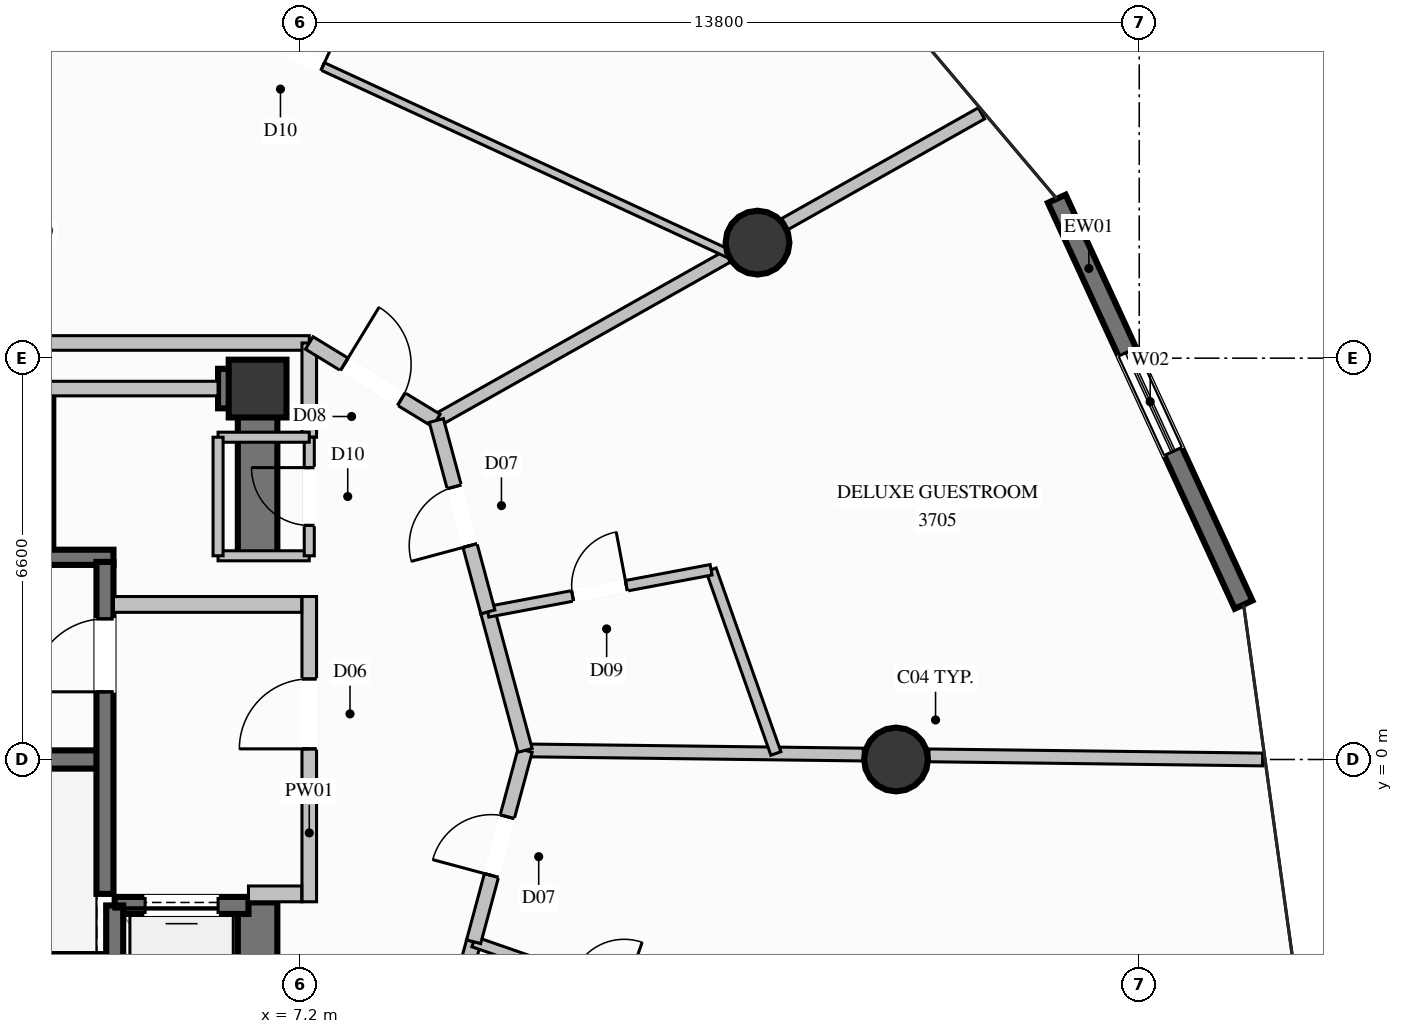
"""IFC4 building model, lengths in metres.
Left out: names, types, materials, properties, quantities, classifications, styles, units other than length and angle.
Written with IfcOpenShell. Run it as: python <this file> out.ifc"""

import sys

from ifc_helpers import new_model, si_unit, direction, frame, frame_2d, origin, origin_2d, place, context, subcontext, project, spatial, rectangle, circle, extrude, element, fill, save


model = new_model("IFC4")
c1 = context("Model", 3, precision=1e-05, world=origin(), true_north=direction((0.0, 1.0)))
c2 = subcontext(c1, "Body", "Model", "MODEL_VIEW")
j1 = project(units=[si_unit("LENGTHUNIT", "METRE"), si_unit("PLANEANGLEUNIT", "RADIAN")], contexts=[c1])
p1 = place(None, origin())
s1 = spatial("IfcSite", under=j1, at=p1, CompositionType="ELEMENT")
p2 = place(p1, origin())
s2 = spatial("IfcBuilding", under=s1, at=p2, CompositionType="ELEMENT")
p3 = place(p2, frame((0.0, 0.0, 138.6)))
s3 = spatial("IfcBuildingStorey", under=s2, at=p3, CompositionType="ELEMENT", Elevation=138.6)
p4 = place(p3, frame((6.5, 6.1, 0.0), z_axis=(0.0, 0.0, 1.0), x_axis=(1.0, 0.0, 0.0)))
e1 = element("IfcColumn", 1, at=p4, inside=s3, PredefinedType="COLUMN", context=c2, shape_type="SweptSolid", body=[
    extrude(rectangle(XDim=0.95, YDim=0.95, at=origin_2d()), origin(), (0.0, 0.0, 1.0), 3.6),
])
p5 = place(p3, frame((-3.99, 0.0, 0.0), z_axis=(0.0, 0.0, 1.0), x_axis=(1.0, 0.0, 0.0)))
e2 = element("IfcWall", 2, at=p5, inside=s3, PredefinedType="SHEAR", context=c2, shape_type="SweptSolid", body=[
    extrude(rectangle(XDim=7.98, YDim=0.3, at=frame_2d((3.99, 0.0))), origin(), (0.0, 0.0, 1.0), 3.6),
])
for number, where, z_axis, x_axis in (
    (3, (-4.13, -3.325, 0.0), (0.0, 0.0, 1.0), (1.0, 0.0, 0.0)),
    (4, (-4.13, 3.325, 0.0), (0.0, 0.0, 1.0), (1.0, 0.0, 0.0)),
):
    element("IfcWall", number, at=place(p3, frame(where, z_axis=z_axis, x_axis=x_axis)), inside=s3, PredefinedType="SOLIDWALL", context=c2, shape_type="SweptSolid", body=[
        extrude(rectangle(XDim=8.26, YDim=0.25, at=frame_2d((4.13, 0.0))), origin(), (0.0, 0.0, 1.0), 3.6),
    ])
p6 = place(p3, frame((5.85, 6.1, 0.0), z_axis=(0.0, 0.0, 1.0), x_axis=(1.0, 0.0, 0.0)))
e5 = element("IfcWall", 5, at=p6, inside=s3, PredefinedType="SHEAR", context=c2, shape_type="SweptSolid", body=[
    extrude(rectangle(XDim=0.325, YDim=0.65, at=frame_2d((0.163, 0.0))), origin(), (0.0, 0.0, 1.0), 3.6),
])
p7 = place(p3, frame((6.5, -6.425, 0.0), z_axis=(0.0, 0.0, 1.0), x_axis=(0.0, 1.0, 0.0)))
e6 = element("IfcWall", 6, at=p7, inside=s3, PredefinedType="SHEAR", context=c2, shape_type="SweptSolid", body=[
    extrude(rectangle(XDim=4.075, YDim=0.65, at=frame_2d((2.038, 0.0))), origin(), (0.0, 0.0, 1.0), 3.6),
])
p8 = place(p3, frame((6.5, 3.35, 0.0), z_axis=(0.0, 0.0, 1.0), x_axis=(0.0, 1.0, 0.0)))
e7 = element("IfcWall", 7, at=p8, inside=s3, PredefinedType="SHEAR", context=c2, shape_type="SweptSolid", body=[
    extrude(rectangle(XDim=3.075, YDim=0.65, at=frame_2d((1.538, 0.0))), origin(), (0.0, 0.0, 1.0), 3.6),
])
for number, where, z_axis, x_axis in (
    (8, (17.0, 0.0, 0.0), (0.0, 0.0, 1.0), (1.0, 0.0, 0.0)),
    (9, (14.722, 8.5, 0.0), (0.0, 0.0, 1.0), (1.0, 0.0, 0.0)),
):
    element("IfcColumn", number, at=place(p3, frame(where, z_axis=z_axis, x_axis=x_axis)), inside=s3, PredefinedType="COLUMN", context=c2, shape_type="SweptSolid", body=[
        extrude(circle(Radius=0.525, at=origin_2d()), origin(), (0.0, 0.0, 1.0), 3.6),
    ])
p9 = place(p3, frame((19.644, 9.221, 0.0), z_axis=(0.0, 0.0, 1.0), x_axis=(0.4181370769, -0.90838394136, 0.0)))
e10 = element("IfcWall", 10, at=p9, inside=s3, PredefinedType="SOLIDWALL", context=c2, shape_type="SweptSolid", body=[
    extrude(rectangle(XDim=7.347, YDim=0.32, at=frame_2d((3.673, 0.0))), origin(), (0.0, 0.0, 1.0), 3.35),
])
p10 = place(p9, frame((2.774, 0.0, 0.35)))
e11 = element("IfcOpeningElement", 11, at=p10, cuts=e10, PredefinedType="OPENING", context=c2, shape_type="SweptSolid", body=[
    extrude(rectangle(XDim=1.8, YDim=2.6, at=frame_2d((0.9, 1.3))), frame((0.0, 0.17, 0.0), z_axis=(0.0, -1.0, 0.0), x_axis=(1.0, 0.0, 0.0)), (0.0, 0.0, 1.0), 0.34),
])
p11 = place(p3, frame((3.0, 3.5, 0.0), z_axis=(0.0, 0.0, 1.0), x_axis=(0.0, 1.0, 0.0)))
e12 = element("IfcWall", 12, at=p11, inside=s3, PredefinedType="SOLIDWALL", context=c2, shape_type="SweptSolid", body=[
    extrude(rectangle(XDim=2.5, YDim=0.28, at=frame_2d((1.25, 0.0))), origin(), (0.0, 0.0, 1.0), 3.35),
])
p12 = place(p3, frame((6.35, -2.4, 0.0), z_axis=(0.0, 0.0, 1.0), x_axis=(-1.0, 0.0, 0.0)))
e13 = element("IfcWall", 13, at=p12, inside=s3, PredefinedType="SOLIDWALL", context=c2, shape_type="SweptSolid", body=[
    extrude(rectangle(XDim=2.2, YDim=0.28, at=frame_2d((1.1, 0.0))), origin(), (0.0, 0.0, 1.0), 3.35),
])
p13 = place(p12, frame((0.5, 0.0, 0.0)))
e14 = element("IfcOpeningElement", 14, at=p13, cuts=e13, PredefinedType="OPENING", context=c2, shape_type="SweptSolid", body=[
    extrude(rectangle(XDim=1.2, YDim=2.2, at=frame_2d((0.6, 1.1))), frame((0.0, 0.15, 0.0), z_axis=(0.0, -1.0, 0.0), x_axis=(1.0, 0.0, 0.0)), (0.0, 0.0, 1.0), 0.3),
])
p14 = place(p3, frame((4.15, -2.4, 0.0), z_axis=(0.0, 0.0, 1.0), x_axis=(0.0, -1.0, 0.0)))
e15 = element("IfcWall", 15, at=p14, inside=s3, PredefinedType="SOLIDWALL", context=c2, shape_type="SweptSolid", body=[
    extrude(rectangle(XDim=2.7, YDim=0.28, at=frame_2d((1.35, 0.0))), origin(), (0.0, 0.0, 1.0), 3.35),
])
p15 = place(p3, frame((3.99, -2.21, 0.0), z_axis=(0.0, 0.0, 1.0), x_axis=(0.0, 1.0, 0.0)))
e16 = element("IfcWall", 16, at=p15, inside=s3, PredefinedType="SOLIDWALL", context=c2, shape_type="SweptSolid", body=[
    extrude(rectangle(XDim=5.46, YDim=0.28, at=frame_2d((2.73, 0.0))), origin(), (0.0, 0.0, 1.0), 3.35),
])
p16 = place(p15, frame((3.323, 0.0, 0.0)))
e17 = element("IfcOpeningElement", 17, at=p16, cuts=e16, PredefinedType="OPENING", context=c2, shape_type="SweptSolid", body=[
    extrude(rectangle(XDim=1.2, YDim=2.2, at=frame_2d((0.6, 1.1))), frame((0.0, 0.15, 0.0), z_axis=(0.0, -1.0, 0.0), x_axis=(1.0, 0.0, 0.0)), (0.0, 0.0, 1.0), 0.3),
])
p17 = place(p3, frame((7.35, -2.34, 0.0), z_axis=(0.0, 0.0, 1.0), x_axis=(0.0, 1.0, 0.0)))
e18 = element("IfcWall", 18, at=p17, inside=s3, PredefinedType="PARTITIONING", context=c2, shape_type="SweptSolid", body=[
    extrude(rectangle(XDim=5.02, YDim=0.24, at=frame_2d((2.51, 0.0))), origin(), (0.0, 0.0, 1.0), 2.435),
])
p18 = place(p17, frame((2.515, 0.0, 0.0)))
e19 = element("IfcOpeningElement", 19, at=p18, cuts=e18, PredefinedType="OPENING", context=c2, shape_type="SweptSolid", body=[
    extrude(rectangle(XDim=1.15, YDim=2.2, at=frame_2d((0.575, 1.1))), frame((0.0, 0.13, 0.0), z_axis=(0.0, -1.0, 0.0), x_axis=(1.0, 0.0, 0.0)), (0.0, 0.0, 1.0), 0.26),
])
p19 = place(p3, frame((6.35, -2.21, 0.0), z_axis=(0.0, 0.0, 1.0), x_axis=(1.0, 0.0, 0.0)))
e20 = element("IfcWall", 20, at=p19, inside=s3, PredefinedType="PARTITIONING", context=c2, shape_type="SweptSolid", body=[
    extrude(rectangle(XDim=0.875, YDim=0.26, at=frame_2d((0.438, 0.0))), origin(), (0.0, 0.0, 1.0), 3.35),
])
p20 = place(p3, frame((4.13, 2.55, 0.0), z_axis=(0.0, 0.0, 1.0), x_axis=(1.0, 0.0, 0.0)))
e21 = element("IfcWall", 21, at=p20, inside=s3, PredefinedType="PARTITIONING", context=c2, shape_type="SweptSolid", body=[
    extrude(rectangle(XDim=3.095, YDim=0.26, at=frame_2d((1.548, 0.0))), origin(), (0.0, 0.0, 1.0), 3.35),
])
p21 = place(p3, frame((-7.35, 6.85, 0.0), z_axis=(0.0, 0.0, 1.0), x_axis=(1.0, 0.0, 0.0)))
e22 = element("IfcWall", 22, at=p21, inside=s3, PredefinedType="PARTITIONING", context=c2, shape_type="SweptSolid", body=[
    extrude(rectangle(XDim=14.7, YDim=0.24, at=frame_2d((7.35, 0.0))), origin(), (0.0, 0.0, 1.0), 2.435),
])
p22 = place(p3, frame((7.35, 5.3, 0.0), z_axis=(0.0, 0.0, 1.0), x_axis=(0.0, 1.0, 0.0)))
e23 = element("IfcWall", 23, at=p22, inside=s3, PredefinedType="PARTITIONING", context=c2, shape_type="SweptSolid", body=[
    extrude(rectangle(XDim=1.55, YDim=0.24, at=frame_2d((0.775, 0.0))), origin(), (0.0, 0.0, 1.0), 2.435),
])
p23 = place(p3, frame((3.0, 6.1, 0.0), z_axis=(0.0, 0.0, 1.0), x_axis=(1.0, 0.0, 0.0)))
e24 = element("IfcWall", 24, at=p23, inside=s3, PredefinedType="PARTITIONING", context=c2, shape_type="SweptSolid", body=[
    extrude(rectangle(XDim=2.85, YDim=0.24, at=frame_2d((1.425, 0.0))), origin(), (0.0, 0.0, 1.0), 2.435),
])
p24 = place(p3, frame((5.85, 3.35, 0.0), z_axis=(0.0, 0.0, 1.0), x_axis=(1.0, 0.0, 0.0)))
e25 = element("IfcWall", 25, at=p24, inside=s3, PredefinedType="PARTITIONING", context=c2, shape_type="SweptSolid", body=[
    extrude(rectangle(XDim=1.5, YDim=0.165, at=frame_2d((0.75, 0.0))), origin(), (0.0, 0.0, 1.0), 3.35),
])
p25 = place(p3, frame((7.35, 3.35, 0.0), z_axis=(0.0, 0.0, 1.0), x_axis=(0.0, 1.0, 0.0)))
e26 = element("IfcWall", 26, at=p25, inside=s3, PredefinedType="PARTITIONING", context=c2, shape_type="SweptSolid", body=[
    extrude(rectangle(XDim=1.95, YDim=0.165, at=frame_2d((0.975, 0.0))), origin(), (0.0, 0.0, 1.0), 3.35),
])
p26 = place(p25, frame((0.5, 0.0, 0.0)))
e27 = element("IfcOpeningElement", 27, at=p26, cuts=e26, PredefinedType="OPENING", context=c2, shape_type="SweptSolid", body=[
    extrude(rectangle(XDim=0.95, YDim=2.1, at=frame_2d((0.475, 1.05))), frame((0.0, 0.093, 0.0), z_axis=(0.0, -1.0, 0.0), x_axis=(1.0, 0.0, 0.0)), (0.0, 0.0, 1.0), 0.185),
])
p27 = place(p3, frame((7.35, 5.3, 0.0), z_axis=(0.0, 0.0, 1.0), x_axis=(-1.0, 0.0, 0.0)))
e28 = element("IfcWall", 28, at=p27, inside=s3, PredefinedType="PARTITIONING", context=c2, shape_type="SweptSolid", body=[
    extrude(rectangle(XDim=1.5, YDim=0.165, at=frame_2d((0.75, 0.0))), origin(), (0.0, 0.0, 1.0), 2.435),
])
p28 = place(p3, frame((5.85, 5.3, 0.0), z_axis=(0.0, 0.0, 1.0), x_axis=(0.0, -1.0, 0.0)))
e29 = element("IfcWall", 29, at=p28, inside=s3, PredefinedType="PARTITIONING", context=c2, shape_type="SweptSolid", body=[
    extrude(rectangle(XDim=1.95, YDim=0.165, at=frame_2d((0.975, 0.0))), origin(), (0.0, 0.0, 1.0), 2.435),
])
p29 = place(p3, frame((10.9, 0.15, 0.0), z_axis=(0.0, 0.0, 1.0), x_axis=(0.999923372065, -0.012379418339, 0.0)))
e30 = element("IfcWall", 30, at=p29, inside=s3, PredefinedType="PARTITIONING", context=c2, shape_type="SweptSolid", body=[
    extrude(rectangle(XDim=5.562, YDim=0.21, at=frame_2d((2.781, 0.0))), origin(), (0.0, 0.0, 1.0), 3.35),
])
p30 = place(p3, frame((17.541, 0.068, 0.0), z_axis=(0.0, 0.0, 1.0), x_axis=(0.999922985187, -0.012410628269, 0.0)))
e31 = element("IfcWall", 31, at=p30, inside=s3, PredefinedType="PARTITIONING", context=c2, shape_type="SweptSolid", body=[
    extrude(rectangle(XDim=5.489, YDim=0.21, at=frame_2d((2.744, 0.0))), origin(), (0.0, 0.0, 1.0), 3.35),
])
p31 = place(p3, frame((9.44, 5.575, 0.0), z_axis=(0.0, 0.0, 1.0), x_axis=(0.871243078021, 0.490851809613, 0.0)))
e32 = element("IfcWall", 32, at=p31, inside=s3, PredefinedType="PARTITIONING", context=c2, shape_type="SweptSolid", body=[
    extrude(rectangle(XDim=5.495, YDim=0.21, at=frame_2d((2.747, 0.0))), origin(), (0.0, 0.0, 1.0), 2.791),
])
p32 = place(p3, frame((15.173, 8.806, 0.0), z_axis=(0.0, 0.0, 1.0), x_axis=(0.871269436628, 0.490805021162, 0.0)))
e33 = element("IfcWall", 33, at=p32, inside=s3, PredefinedType="PARTITIONING", context=c2, shape_type="SweptSolid", body=[
    extrude(rectangle(XDim=3.708, YDim=0.21, at=frame_2d((1.854, 0.0))), origin(), (0.0, 0.0, 1.0), 3.35),
])
p33 = place(p3, frame((7.35, 6.85, 0.0), z_axis=(0.0, 0.0, 1.0), x_axis=(0.853641534933, -0.520860950579, 0.0)))
e34 = element("IfcWall", 34, at=p33, inside=s3, PredefinedType="PARTITIONING", context=c2, shape_type="SweptSolid", body=[
    extrude(rectangle(XDim=2.448, YDim=0.24, at=frame_2d((1.224, 0.0))), origin(), (0.0, 0.0, 1.0), 3.35),
])
p34 = place(p33, frame((0.674, 0.0, 0.0)))
e35 = element("IfcOpeningElement", 35, at=p34, cuts=e34, PredefinedType="OPENING", context=c2, shape_type="SweptSolid", body=[
    extrude(rectangle(XDim=1.1, YDim=2.3, at=frame_2d((0.55, 1.15))), frame((0.0, 0.13, 0.0), z_axis=(0.0, -1.0, 0.0), x_axis=(1.0, 0.0, 0.0)), (0.0, 0.0, 1.0), 0.26),
])
p35 = place(p3, frame((0.0, 14.89, 0.0), z_axis=(0.0, 0.0, 1.0), x_axis=(0.908063857852, -0.418831744335, 0.0)))
e36 = element("IfcWall", 36, at=p35, inside=s3, PredefinedType="PARTITIONING", context=c2, shape_type="SweptSolid", body=[
    extrude(rectangle(XDim=15.727, YDim=0.135, at=frame_2d((7.863, 0.0))), origin(), (0.0, 0.0, 1.0), 2.878),
])
p36 = place(p35, frame((7.388, 0.0, 0.0)))
e37 = element("IfcOpeningElement", 37, at=p36, cuts=e36, PredefinedType="OPENING", context=c2, shape_type="SweptSolid", body=[
    extrude(rectangle(XDim=0.95, YDim=2.1, at=frame_2d((0.475, 1.05))), frame((0.0, 0.078, 0.0), z_axis=(0.0, -1.0, 0.0), x_axis=(1.0, 0.0, 0.0)), (0.0, 0.0, 1.0), 0.155),
])
p37 = place(p3, frame((9.44, -5.275, 0.0), z_axis=(0.0, 0.0, 1.0), x_axis=(0.25988439237, 0.965639737481, 0.0)))
e38 = element("IfcWall", 38, at=p37, inside=s3, PredefinedType="PARTITIONING", context=c2, shape_type="SweptSolid", body=[
    extrude(rectangle(XDim=2.359, YDim=0.24, at=frame_2d((1.179, 0.0))), origin(), (0.0, 0.0, 1.0), 3.35),
])
p38 = place(p3, frame((10.053, -2.997, 0.0), z_axis=(0.0, 0.0, 1.0), x_axis=(0.944684797039, -0.327979624737, 0.0)))
e39 = element("IfcWall", 39, at=p38, inside=s3, PredefinedType="PLUMBINGWALL", context=c2, shape_type="SweptSolid", body=[
    extrude(rectangle(XDim=4.341, YDim=0.175, at=frame_2d((2.171, 0.0))), origin(), (0.0, 0.0, 1.0), 3.35),
])
p39 = place(p38, frame((1.721, 0.0, 0.0)))
e40 = element("IfcOpeningElement", 40, at=p39, cuts=e39, PredefinedType="OPENING", context=c2, shape_type="SweptSolid", body=[
    extrude(rectangle(XDim=0.9, YDim=2.1, at=frame_2d((0.45, 1.05))), frame((0.0, 0.098, 0.0), z_axis=(0.0, -1.0, 0.0), x_axis=(1.0, 0.0, 0.0)), (0.0, 0.0, 1.0), 0.195),
])
p40 = place(p3, frame((10.053, -2.997, 0.0), z_axis=(0.0, 0.0, 1.0), x_axis=(0.259876755553, 0.965641792759, 0.0)))
e41 = element("IfcWall", 41, at=p40, inside=s3, PredefinedType="PARTITIONING", context=c2, shape_type="SweptSolid", body=[
    extrude(rectangle(XDim=3.259, YDim=0.24, at=frame_2d((1.629, 0.0))), origin(), (0.0, 0.0, 1.0), 2.985),
])
p41 = place(p40, frame((1.129, 0.0, 0.0)))
e42 = element("IfcOpeningElement", 42, at=p41, cuts=e41, PredefinedType="OPENING", context=c2, shape_type="SweptSolid", body=[
    extrude(rectangle(XDim=1.0, YDim=2.2, at=frame_2d((0.5, 1.1))), frame((0.0, 0.13, 0.0), z_axis=(0.0, -1.0, 0.0), x_axis=(1.0, 0.0, 0.0)), (0.0, 0.0, 1.0), 0.26),
])
p42 = place(p3, frame((10.9, 0.15, 0.0), z_axis=(0.0, 0.0, 1.0), x_axis=(-0.259761917731, 0.965672690976, 0.0)))
e43 = element("IfcWall", 43, at=p42, inside=s3, PredefinedType="PARTITIONING", context=c2, shape_type="SweptSolid", body=[
    extrude(rectangle(XDim=2.359, YDim=0.24, at=frame_2d((1.18, 0.0))), origin(), (0.0, 0.0, 1.0), 2.985),
])
p43 = place(p3, frame((15.024, 0.099, 0.0), z_axis=(0.0, 0.0, 1.0), x_axis=(-0.332461284511, 0.943116903836, 0.0)))
e44 = element("IfcWall", 44, at=p43, inside=s3, PredefinedType="PLUMBINGWALL", context=c2, shape_type="SweptSolid", body=[
    extrude(rectangle(XDim=3.203, YDim=0.175, at=frame_2d((1.602, 0.0))), origin(), (0.0, 0.0, 1.0), 3.35),
])
p44 = place(p3, frame((10.287, 2.428, 0.0), z_axis=(0.0, 0.0, 1.0), x_axis=(0.982694206869, 0.185235244446, 0.0)))
e45 = element("IfcWall", 45, at=p44, inside=s3, PredefinedType="PLUMBINGWALL", context=c2, shape_type="SweptSolid", body=[
    extrude(rectangle(XDim=3.737, YDim=0.175, at=frame_2d((1.868, 0.0))), origin(), (0.0, 0.0, 1.0), 3.35),
])
p45 = place(p44, frame((1.418, 0.0, 0.0)))
e46 = element("IfcOpeningElement", 46, at=p45, cuts=e45, PredefinedType="OPENING", context=c2, shape_type="SweptSolid", body=[
    extrude(rectangle(XDim=0.9, YDim=2.1, at=frame_2d((0.45, 1.05))), frame((0.0, 0.098, 0.0), z_axis=(0.0, -1.0, 0.0), x_axis=(1.0, 0.0, 0.0)), (0.0, 0.0, 1.0), 0.195),
])
p46 = place(p3, frame((10.287, 2.428, 0.0), z_axis=(0.0, 0.0, 1.0), x_axis=(-0.259946608151, 0.965622991084, 0.0)))
e47 = element("IfcWall", 47, at=p46, inside=s3, PredefinedType="PARTITIONING", context=c2, shape_type="SweptSolid", body=[
    extrude(rectangle(XDim=3.259, YDim=0.24, at=frame_2d((1.629, 0.0))), origin(), (0.0, 0.0, 1.0), 3.35),
])
p47 = place(p46, frame((1.129, 0.0, 0.0)))
e48 = element("IfcOpeningElement", 48, at=p47, cuts=e47, PredefinedType="OPENING", context=c2, shape_type="SweptSolid", body=[
    extrude(rectangle(XDim=1.0, YDim=2.2, at=frame_2d((0.5, 1.1))), frame((0.0, 0.13, 0.0), z_axis=(0.0, -1.0, 0.0), x_axis=(1.0, 0.0, 0.0)), (0.0, 0.0, 1.0), 0.26),
])
p48 = place(p10, origin())
e49 = element("IfcWindow", 49, at=p48, inside=s3, PartitioningType="SINGLE_PANEL", PredefinedType="WINDOW", context=c2, shape_type="SweptSolid", body=[
    extrude(rectangle(XDim=1.8, YDim=2.6, at=frame_2d((0.9, 1.3))), frame((0.0, 0.03, 0.0), z_axis=(0.0, -1.0, 0.0), x_axis=(1.0, 0.0, 0.0)), (0.0, 0.0, 1.0), 0.06),
])
fill(e11, e49)
p49 = place(p13, origin())
e50 = element("IfcDoor", 50, at=p49, inside=s3, OperationType="SLIDING_TO_LEFT", PredefinedType="DOOR", context=c2, shape_type="SweptSolid", body=[
    extrude(rectangle(XDim=1.2, YDim=2.2, at=frame_2d((0.6, 1.1))), frame((0.0, 0.025, 0.0), z_axis=(0.0, -1.0, 0.0), x_axis=(1.0, 0.0, 0.0)), (0.0, 0.0, 1.0), 0.05),
])
fill(e14, e50)
p50 = place(p16, origin())
e51 = element("IfcDoor", 51, at=p50, inside=s3, OperationType="SINGLE_SWING_LEFT", PredefinedType="DOOR", context=c2, shape_type="SweptSolid", body=[
    extrude(rectangle(XDim=1.2, YDim=2.2, at=frame_2d((0.6, 1.1))), frame((0.0, 0.025, 0.0), z_axis=(0.0, -1.0, 0.0), x_axis=(1.0, 0.0, 0.0)), (0.0, 0.0, 1.0), 0.05),
])
fill(e17, e51)
p51 = place(p18, origin())
e52 = element("IfcDoor", 52, at=p51, inside=s3, OperationType="SINGLE_SWING_LEFT", PredefinedType="DOOR", context=c2, shape_type="SweptSolid", body=[
    extrude(rectangle(XDim=1.15, YDim=2.2, at=frame_2d((0.575, 1.1))), frame((0.0, 0.025, 0.0), z_axis=(0.0, -1.0, 0.0), x_axis=(1.0, 0.0, 0.0)), (0.0, 0.0, 1.0), 0.05),
])
fill(e19, e52)
p52 = place(p26, origin())
e53 = element("IfcDoor", 53, at=p52, inside=s3, OperationType="SINGLE_SWING_RIGHT", PredefinedType="DOOR", context=c2, shape_type="SweptSolid", body=[
    extrude(rectangle(XDim=0.95, YDim=2.1, at=frame_2d((0.475, 1.05))), frame((0.0, 0.025, 0.0), z_axis=(0.0, -1.0, 0.0), x_axis=(1.0, 0.0, 0.0)), (0.0, 0.0, 1.0), 0.05),
])
fill(e27, e53)
p53 = place(p34, origin())
e54 = element("IfcDoor", 54, at=p53, inside=s3, OperationType="SINGLE_SWING_LEFT", PredefinedType="DOOR", context=c2, shape_type="SweptSolid", body=[
    extrude(rectangle(XDim=1.1, YDim=2.3, at=frame_2d((0.55, 1.15))), frame((0.0, 0.025, 0.0), z_axis=(0.0, -1.0, 0.0), x_axis=(1.0, 0.0, 0.0)), (0.0, 0.0, 1.0), 0.05),
])
fill(e35, e54)
p54 = place(p36, origin())
e55 = element("IfcDoor", 55, at=p54, inside=s3, OperationType="SINGLE_SWING_RIGHT", PredefinedType="DOOR", context=c2, shape_type="SweptSolid", body=[
    extrude(rectangle(XDim=0.95, YDim=2.1, at=frame_2d((0.475, 1.05))), frame((0.0, 0.025, 0.0), z_axis=(0.0, -1.0, 0.0), x_axis=(1.0, 0.0, 0.0)), (0.0, 0.0, 1.0), 0.05),
])
fill(e37, e55)
p55 = place(p41, origin())
e56 = element("IfcDoor", 56, at=p55, inside=s3, OperationType="SINGLE_SWING_LEFT", PredefinedType="DOOR", context=c2, shape_type="SweptSolid", body=[
    extrude(rectangle(XDim=1.0, YDim=2.2, at=frame_2d((0.5, 1.1))), frame((0.0, 0.025, 0.0), z_axis=(0.0, -1.0, 0.0), x_axis=(1.0, 0.0, 0.0)), (0.0, 0.0, 1.0), 0.05),
])
fill(e42, e56)
p56 = place(p45, origin())
e57 = element("IfcDoor", 57, at=p56, inside=s3, OperationType="SINGLE_SWING_RIGHT", PredefinedType="DOOR", context=c2, shape_type="SweptSolid", body=[
    extrude(rectangle(XDim=0.9, YDim=2.1, at=frame_2d((0.45, 1.05))), frame((0.0, 0.025, 0.0), z_axis=(0.0, -1.0, 0.0), x_axis=(1.0, 0.0, 0.0)), (0.0, 0.0, 1.0), 0.05),
])
fill(e46, e57)
p57 = place(p47, origin())
e58 = element("IfcDoor", 58, at=p57, inside=s3, OperationType="SINGLE_SWING_LEFT", PredefinedType="DOOR", context=c2, shape_type="SweptSolid", body=[
    extrude(rectangle(XDim=1.0, YDim=2.2, at=frame_2d((0.5, 1.1))), frame((0.0, 0.025, 0.0), z_axis=(0.0, -1.0, 0.0), x_axis=(1.0, 0.0, 0.0)), (0.0, 0.0, 1.0), 0.05),
])
fill(e48, e58)
save(model, sys.argv[1])
